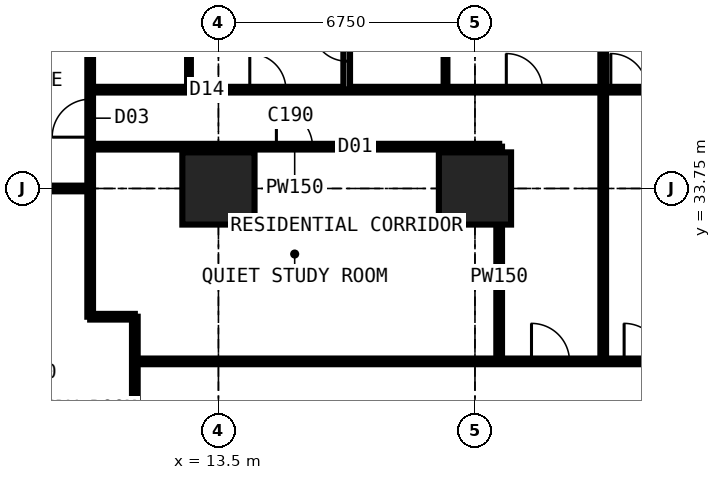
"""IFC4 building model, lengths in metres.
Left out: names, types, materials, properties, quantities, classifications, styles, units other than length and angle.
Written with IfcOpenShell. Run it as: python <this file> out.ifc"""

import sys

from ifc_helpers import new_model, si_unit, direction, frame, frame_2d, origin, origin_2d, place, context, subcontext, project, spatial, rectangle, extrude, element, fill, save


model = new_model("IFC4")
c1 = context("Model", 3, precision=1e-05, world=origin(), true_north=direction((0.0, 1.0)))
c2 = subcontext(c1, "Body", "Model", "MODEL_VIEW")
j1 = project(units=[si_unit("LENGTHUNIT", "METRE"), si_unit("PLANEANGLEUNIT", "RADIAN")], contexts=[c1])
p1 = place(None, origin())
s1 = spatial("IfcSite", under=j1, at=p1, CompositionType="ELEMENT")
p2 = place(p1, origin())
s2 = spatial("IfcBuilding", under=s1, at=p2, CompositionType="ELEMENT")
p3 = place(p2, frame((0.0, 0.0, 28.8)))
s3 = spatial("IfcBuildingStorey", under=s2, at=p3, CompositionType="ELEMENT", Elevation=28.8)
for number, where, z_axis, x_axis in (
    (1, (13.5, 33.75, 0.0), (0.0, 0.0, 1.0), (1.0, 0.0, 0.0)),
    (2, (20.25, 33.75, 0.0), (0.0, 0.0, 1.0), (1.0, 0.0, 0.0)),
):
    element("IfcColumn", number, at=place(p3, frame(where, z_axis=z_axis, x_axis=x_axis)), inside=s3, PredefinedType="COLUMN", context=c2, shape_type="SweptSolid", body=[
        extrude(rectangle(XDim=1.9, YDim=1.9, at=origin_2d()), origin(), (0.0, 0.0, 1.0), 3.6),
    ])
p4 = place(p3, frame((4.15, 33.75, 0.0), z_axis=(0.0, 0.0, 1.0), x_axis=(1.0, 0.0, 0.0)))
e3 = element("IfcWall", 3, at=p4, inside=s3, PredefinedType="PARTITIONING", context=c2, shape_type="SweptSolid", body=[
    extrude(rectangle(XDim=5.975, YDim=0.15, at=frame_2d((2.988, 0.0))), origin(), (0.0, 0.0, 1.0), 2.877),
])
p5 = place(p3, frame((10.125, 30.375, 0.0), z_axis=(0.0, 0.0, 1.0), x_axis=(0.0, 1.0, 0.0)))
e4 = element("IfcWall", 4, at=p5, inside=s3, PredefinedType="PARTITIONING", context=c2, shape_type="SweptSolid", body=[
    extrude(rectangle(XDim=10.859, YDim=0.15, at=frame_2d((5.429, 0.0))), origin(), (0.0, 0.0, 1.0), 3.375),
])
p6 = place(p5, frame((4.725, 0.0, 0.0)))
e5 = element("IfcOpeningElement", 5, at=p6, cuts=e4, PredefinedType="OPENING", context=c2, shape_type="SweptSolid", body=[
    extrude(rectangle(XDim=1.0, YDim=2.2, at=frame_2d((0.5, 1.1))), frame((0.0, 0.085, 0.0), z_axis=(0.0, -1.0, 0.0), x_axis=(1.0, 0.0, 0.0)), (0.0, 0.0, 1.0), 0.17),
])
p7 = place(p3, frame((10.125, 30.375, 0.0), z_axis=(0.0, 0.0, 1.0), x_axis=(1.0, 0.0, 0.0)))
e6 = element("IfcWall", 6, at=p7, inside=s3, PredefinedType="PARTITIONING", context=c2, shape_type="SweptSolid", body=[
    extrude(rectangle(XDim=1.175, YDim=0.15, at=frame_2d((0.587, 0.0))), origin(), (0.0, 0.0, 1.0), 3.375),
])
p8 = place(p3, frame((10.125, 34.85, 0.0), z_axis=(0.0, 0.0, 1.0), x_axis=(1.0, 0.0, 0.0)))
e7 = element("IfcWall", 7, at=p8, inside=s3, PredefinedType="PARTITIONING", context=c2, shape_type="SweptSolid", body=[
    extrude(rectangle(XDim=10.762, YDim=0.15, at=frame_2d((5.381, 0.0))), origin(), (0.0, 0.0, 1.0), 3.375),
])
p9 = place(p8, frame((4.9, 0.0, 0.0)))
e8 = element("IfcOpeningElement", 8, at=p9, cuts=e7, PredefinedType="OPENING", context=c2, shape_type="SweptSolid", body=[
    extrude(rectangle(XDim=0.95, YDim=2.2, at=frame_2d((0.475, 1.1))), frame((0.0, 0.085, 0.0), z_axis=(0.0, -1.0, 0.0), x_axis=(1.0, 0.0, 0.0)), (0.0, 0.0, 1.0), 0.17),
])
p10 = place(p3, frame((10.125, 36.35, 0.0), z_axis=(0.0, 0.0, 1.0), x_axis=(1.0, 0.0, 0.0)))
e9 = element("IfcWall", 9, at=p10, inside=s3, PredefinedType="PARTITIONING", context=c2, shape_type="SweptSolid", body=[
    extrude(rectangle(XDim=23.625, YDim=0.15, at=frame_2d((11.812, 0.0))), origin(), (0.0, 0.0, 1.0), 3.375),
])
p11 = place(p10, frame((20.5, 0.0, 0.0)))
e10 = element("IfcOpeningElement", 10, at=p11, cuts=e9, PredefinedType="OPENING", context=c2, shape_type="SweptSolid", body=[
    extrude(rectangle(XDim=0.95, YDim=2.2, at=frame_2d((0.475, 1.1))), frame((0.0, 0.085, 0.0), z_axis=(0.0, -1.0, 0.0), x_axis=(1.0, 0.0, 0.0)), (0.0, 0.0, 1.0), 0.17),
])
p12 = place(p10, frame((17.125, 0.0, 0.0)))
e11 = element("IfcOpeningElement", 11, at=p12, cuts=e9, PredefinedType="OPENING", context=c2, shape_type="SweptSolid", body=[
    extrude(rectangle(XDim=0.95, YDim=2.2, at=frame_2d((0.475, 1.1))), frame((0.0, 0.085, 0.0), z_axis=(0.0, -1.0, 0.0), x_axis=(1.0, 0.0, 0.0)), (0.0, 0.0, 1.0), 0.17),
])
p13 = place(p10, frame((13.7, 0.0, 0.0)))
e12 = element("IfcOpeningElement", 12, at=p13, cuts=e9, PredefinedType="OPENING", context=c2, shape_type="SweptSolid", body=[
    extrude(rectangle(XDim=0.95, YDim=2.2, at=frame_2d((0.475, 1.1))), frame((0.0, 0.085, 0.0), z_axis=(0.0, -1.0, 0.0), x_axis=(1.0, 0.0, 0.0)), (0.0, 0.0, 1.0), 0.17),
])
p14 = place(p10, frame((4.2, 0.0, 0.0)))
e13 = element("IfcOpeningElement", 13, at=p14, cuts=e9, PredefinedType="OPENING", context=c2, shape_type="SweptSolid", body=[
    extrude(rectangle(XDim=0.95, YDim=2.2, at=frame_2d((0.475, 1.1))), frame((0.0, 0.085, 0.0), z_axis=(0.0, -1.0, 0.0), x_axis=(1.0, 0.0, 0.0)), (0.0, 0.0, 1.0), 0.17),
])
p15 = place(p10, frame((10.95, 0.0, 0.0)))
e14 = element("IfcOpeningElement", 14, at=p15, cuts=e9, PredefinedType="OPENING", context=c2, shape_type="SweptSolid", body=[
    extrude(rectangle(XDim=0.95, YDim=2.2, at=frame_2d((0.475, 1.1))), frame((0.0, 0.085, 0.0), z_axis=(0.0, -1.0, 0.0), x_axis=(1.0, 0.0, 0.0)), (0.0, 0.0, 1.0), 0.17),
])
p16 = place(p3, frame((11.3, 11.3, 0.0), z_axis=(0.0, 0.0, 1.0), x_axis=(0.0, 1.0, 0.0)))
e15 = element("IfcWall", 15, at=p16, inside=s3, PredefinedType="PARTITIONING", context=c2, shape_type="SweptSolid", body=[
    extrude(rectangle(XDim=19.075, YDim=0.15, at=frame_2d((9.538, 0.0))), origin(), (0.0, 0.0, 1.0), 3.375),
])
p17 = place(p16, frame((10.137, 0.0, 0.0)))
e16 = element("IfcOpeningElement", 16, at=p17, cuts=e15, PredefinedType="OPENING", context=c2, shape_type="SweptSolid", body=[
    extrude(rectangle(XDim=1.0, YDim=2.2, at=frame_2d((0.5, 1.1))), frame((0.0, 0.085, 0.0), z_axis=(0.0, -1.0, 0.0), x_axis=(1.0, 0.0, 0.0)), (0.0, 0.0, 1.0), 0.17),
])
p18 = place(p3, frame((11.3, 29.2, 0.0), z_axis=(0.0, 0.0, 1.0), x_axis=(1.0, 0.0, 0.0)))
e17 = element("IfcWall", 17, at=p18, inside=s3, PredefinedType="PARTITIONING", context=c2, shape_type="SweptSolid", body=[
    extrude(rectangle(XDim=19.075, YDim=0.15, at=frame_2d((9.538, 0.0))), origin(), (0.0, 0.0, 1.0), 3.375),
])
p19 = place(p18, frame((12.875, 0.0, 0.0)))
e18 = element("IfcOpeningElement", 18, at=p19, cuts=e17, PredefinedType="OPENING", context=c2, shape_type="SweptSolid", body=[
    extrude(rectangle(XDim=1.0, YDim=2.2, at=frame_2d((0.5, 1.1))), frame((0.0, 0.085, 0.0), z_axis=(0.0, -1.0, 0.0), x_axis=(1.0, 0.0, 0.0)), (0.0, 0.0, 1.0), 0.17),
])
p20 = place(p18, frame((10.438, 0.0, 0.0)))
e19 = element("IfcOpeningElement", 19, at=p20, cuts=e17, PredefinedType="OPENING", context=c2, shape_type="SweptSolid", body=[
    extrude(rectangle(XDim=1.0, YDim=2.2, at=frame_2d((0.5, 1.1))), frame((0.0, 0.085, 0.0), z_axis=(0.0, -1.0, 0.0), x_axis=(1.0, 0.0, 0.0)), (0.0, 0.0, 1.0), 0.17),
])
p21 = place(p18, frame((14.875, 0.0, 0.0)))
e20 = element("IfcOpeningElement", 20, at=p21, cuts=e17, PredefinedType="OPENING", context=c2, shape_type="SweptSolid", body=[
    extrude(rectangle(XDim=0.95, YDim=2.2, at=frame_2d((0.475, 1.1))), frame((0.0, 0.085, 0.0), z_axis=(0.0, -1.0, 0.0), x_axis=(1.0, 0.0, 0.0)), (0.0, 0.0, 1.0), 0.17),
])
p22 = place(p3, frame((12.725, 36.35, 0.0), z_axis=(0.0, 0.0, 1.0), x_axis=(0.0, 1.0, 0.0)))
e21 = element("IfcWall", 21, at=p22, inside=s3, PredefinedType="PARTITIONING", context=c2, shape_type="SweptSolid", body=[
    extrude(rectangle(XDim=2.4, YDim=0.1, at=frame_2d((1.2, 0.0))), origin(), (0.0, 0.0, 1.0), 3.375),
])
p23 = place(p3, frame((16.875, 36.35, 0.0), z_axis=(0.0, 0.0, 1.0), x_axis=(0.0, 1.0, 0.0)))
e22 = element("IfcWall", 22, at=p23, inside=s3, PredefinedType="PARTITIONING", context=c2, shape_type="SweptSolid", body=[
    extrude(rectangle(XDim=4.884, YDim=0.175, at=frame_2d((2.442, 0.0))), origin(), (0.0, 0.0, 1.0), 3.375),
])
p24 = place(p23, frame((0.75, 0.0, 0.0)))
e23 = element("IfcOpeningElement", 23, at=p24, cuts=e22, PredefinedType="OPENING", context=c2, shape_type="SweptSolid", body=[
    extrude(rectangle(XDim=0.9, YDim=2.2, at=frame_2d((0.45, 1.1))), frame((0.0, 0.097, 0.0), z_axis=(0.0, -1.0, 0.0), x_axis=(1.0, 0.0, 0.0)), (0.0, 0.0, 1.0), 0.195),
])
p25 = place(p3, frame((19.475, 36.35, 0.0), z_axis=(0.0, 0.0, 1.0), x_axis=(0.0, 1.0, 0.0)))
e24 = element("IfcWall", 24, at=p25, inside=s3, PredefinedType="PARTITIONING", context=c2, shape_type="SweptSolid", body=[
    extrude(rectangle(XDim=2.4, YDim=0.1, at=frame_2d((1.2, 0.0))), origin(), (0.0, 0.0, 1.0), 3.375),
])
p26 = place(p3, frame((20.887, 29.2, 0.0), z_axis=(0.0, 0.0, 1.0), x_axis=(0.0, 1.0, 0.0)))
e25 = element("IfcWall", 25, at=p26, inside=s3, PredefinedType="PARTITIONING", context=c2, shape_type="SweptSolid", body=[
    extrude(rectangle(XDim=5.65, YDim=0.15, at=frame_2d((2.825, 0.0))), origin(), (0.0, 0.0, 1.0), 3.375),
])
p27 = place(p3, frame((23.625, 29.2, 0.0), z_axis=(0.0, 0.0, 1.0), x_axis=(0.0, 1.0, 0.0)))
e26 = element("IfcWall", 26, at=p27, inside=s3, PredefinedType="PARTITIONING", context=c2, shape_type="SweptSolid", body=[
    extrude(rectangle(XDim=12.034, YDim=0.15, at=frame_2d((6.017, 0.0))), origin(), (0.0, 0.0, 1.0), 3.375),
])
p28 = place(p13, origin())
e27 = element("IfcDoor", 27, at=p28, inside=s3, OperationType="SINGLE_SWING_LEFT", PredefinedType="DOOR", context=c2, shape_type="SweptSolid", body=[
    extrude(rectangle(XDim=0.95, YDim=2.2, at=frame_2d((0.475, 1.1))), frame((0.0, 0.025, 0.0), z_axis=(0.0, -1.0, 0.0), x_axis=(1.0, 0.0, 0.0)), (0.0, 0.0, 1.0), 0.05),
])
fill(e12, e27)
p29 = place(p19, origin())
e28 = element("IfcDoor", 28, at=p29, inside=s3, OperationType="SINGLE_SWING_LEFT", PredefinedType="DOOR", context=c2, shape_type="SweptSolid", body=[
    extrude(rectangle(XDim=1.0, YDim=2.2, at=frame_2d((0.5, 1.1))), frame((0.0, 0.025, 0.0), z_axis=(0.0, -1.0, 0.0), x_axis=(1.0, 0.0, 0.0)), (0.0, 0.0, 1.0), 0.05),
])
fill(e18, e28)
p30 = place(p14, origin())
e29 = element("IfcDoor", 29, at=p30, inside=s3, OperationType="SINGLE_SWING_LEFT", PredefinedType="DOOR", context=c2, shape_type="SweptSolid", body=[
    extrude(rectangle(XDim=0.95, YDim=2.2, at=frame_2d((0.475, 1.1))), frame((0.0, 0.025, 0.0), z_axis=(0.0, -1.0, 0.0), x_axis=(1.0, 0.0, 0.0)), (0.0, 0.0, 1.0), 0.05),
])
fill(e13, e29)
p31 = place(p15, origin())
e30 = element("IfcDoor", 30, at=p31, inside=s3, OperationType="SINGLE_SWING_LEFT", PredefinedType="DOOR", context=c2, shape_type="SweptSolid", body=[
    extrude(rectangle(XDim=0.95, YDim=2.2, at=frame_2d((0.475, 1.1))), frame((0.0, 0.025, 0.0), z_axis=(0.0, -1.0, 0.0), x_axis=(1.0, 0.0, 0.0)), (0.0, 0.0, 1.0), 0.05),
])
fill(e14, e30)
p32 = place(p24, origin())
e31 = element("IfcDoor", 31, at=p32, inside=s3, OperationType="SINGLE_SWING_RIGHT", PredefinedType="DOOR", context=c2, shape_type="SweptSolid", body=[
    extrude(rectangle(XDim=0.9, YDim=2.2, at=frame_2d((0.45, 1.1))), frame((0.0, 0.025, 0.0), z_axis=(0.0, -1.0, 0.0), x_axis=(1.0, 0.0, 0.0)), (0.0, 0.0, 1.0), 0.05),
])
fill(e23, e31)
p33 = place(p20, origin())
e32 = element("IfcDoor", 32, at=p33, inside=s3, OperationType="SINGLE_SWING_LEFT", PredefinedType="DOOR", context=c2, shape_type="SweptSolid", body=[
    extrude(rectangle(XDim=1.0, YDim=2.2, at=frame_2d((0.5, 1.1))), frame((0.0, 0.025, 0.0), z_axis=(0.0, -1.0, 0.0), x_axis=(1.0, 0.0, 0.0)), (0.0, 0.0, 1.0), 0.05),
])
fill(e19, e32)
p34 = place(p9, origin())
e33 = element("IfcDoor", 33, at=p34, inside=s3, OperationType="SINGLE_SWING_LEFT", PredefinedType="DOOR", context=c2, shape_type="SweptSolid", body=[
    extrude(rectangle(XDim=0.95, YDim=2.2, at=frame_2d((0.475, 1.1))), frame((0.0, 0.025, 0.0), z_axis=(0.0, -1.0, 0.0), x_axis=(1.0, 0.0, 0.0)), (0.0, 0.0, 1.0), 0.05),
])
fill(e8, e33)
p35 = place(p6, origin())
e34 = element("IfcDoor", 34, at=p35, inside=s3, OperationType="SINGLE_SWING_LEFT", PredefinedType="DOOR", context=c2, shape_type="SweptSolid", body=[
    extrude(rectangle(XDim=1.0, YDim=2.2, at=frame_2d((0.5, 1.1))), frame((0.0, 0.025, 0.0), z_axis=(0.0, -1.0, 0.0), x_axis=(1.0, 0.0, 0.0)), (0.0, 0.0, 1.0), 0.05),
])
fill(e5, e34)
save(model, sys.argv[1])
